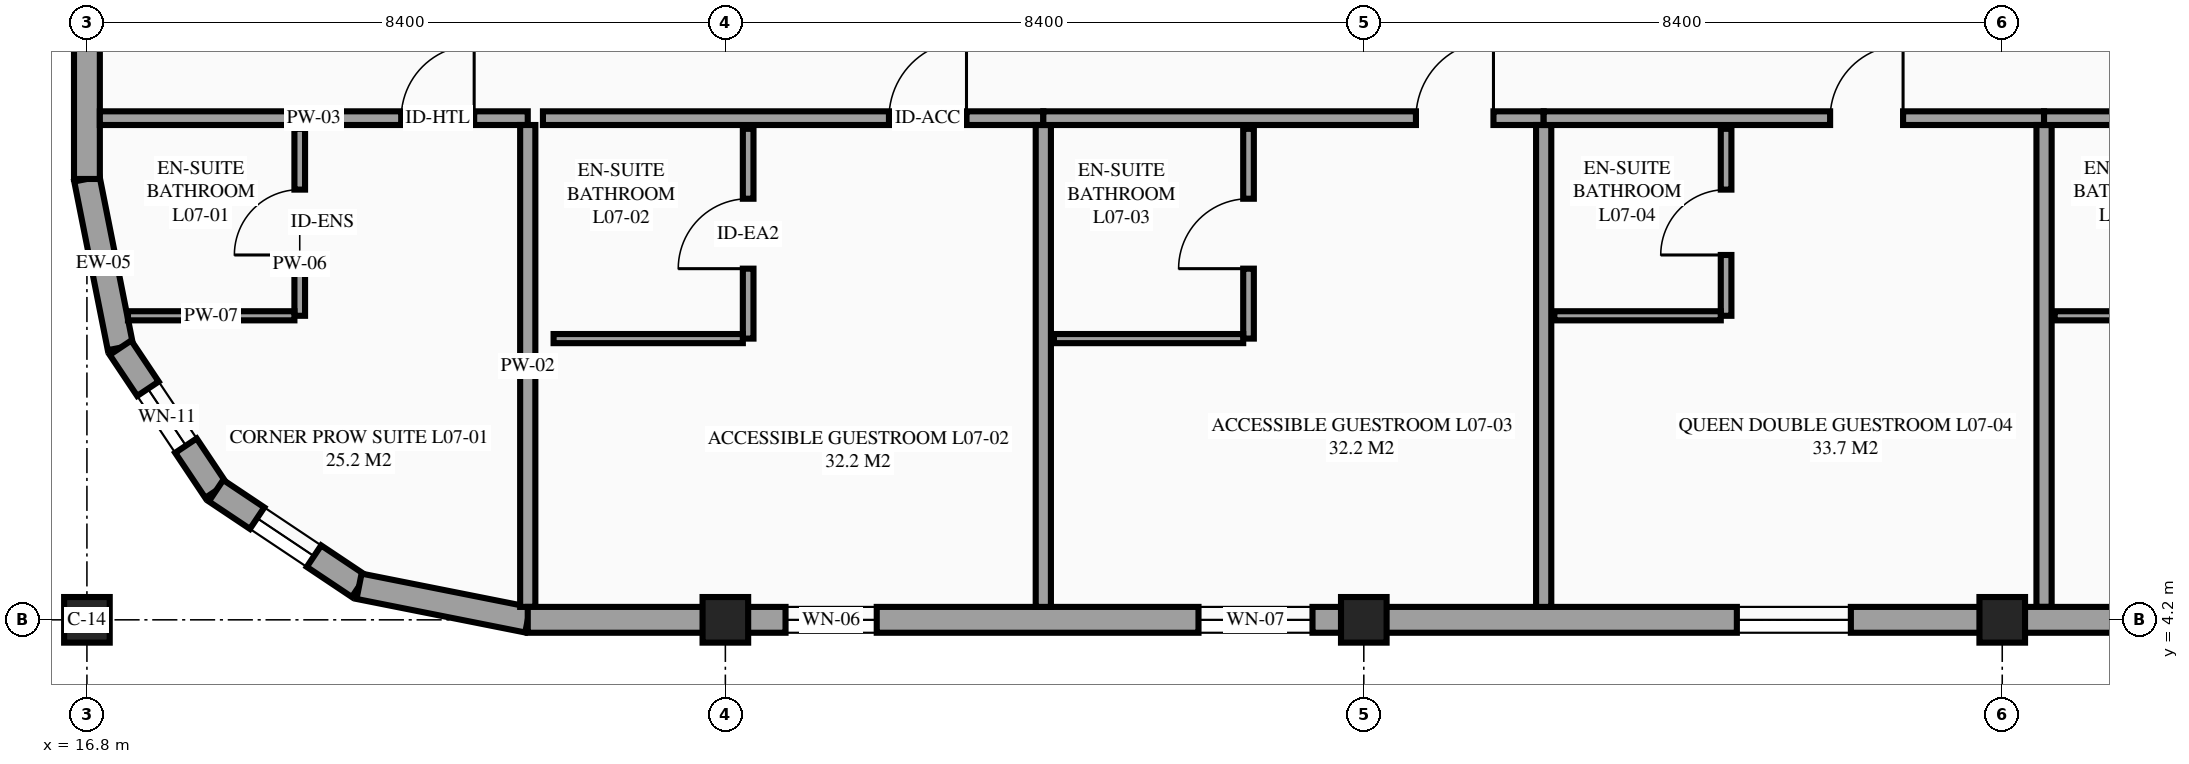
"""IFC4 building model, lengths in metres.
Left out: names, types, materials, properties, quantities, classifications, styles, units other than length and angle.
Written with IfcOpenShell. Run it as: python <this file> out.ifc"""

import sys

from ifc_helpers import new_model, si_unit, direction, frame, frame_2d, origin, origin_2d, place, context, subcontext, project, spatial, rectangle, extrude, element, fill, save


model = new_model("IFC4")
c1 = context("Model", 3, precision=1e-05, world=origin(), true_north=direction((0.0, 1.0)))
c2 = subcontext(c1, "Body", "Model", "MODEL_VIEW")
j1 = project(units=[si_unit("LENGTHUNIT", "METRE"), si_unit("PLANEANGLEUNIT", "RADIAN")], contexts=[c1])
p1 = place(None, origin())
s1 = spatial("IfcSite", under=j1, at=p1, CompositionType="ELEMENT")
p2 = place(p1, origin())
s2 = spatial("IfcBuilding", under=s1, at=p2, CompositionType="ELEMENT")
p3 = place(p2, frame((0.0, 0.0, 29.1)))
s3 = spatial("IfcBuildingStorey", under=s2, at=p3, CompositionType="ELEMENT", Elevation=29.1)
for number, where, z_axis, x_axis in (
    (1, (16.8, 4.2, 0.0), (0.0, 0.0, 1.0), (1.0, 0.0, 0.0)),
    (2, (25.2, 4.2, 0.0), (0.0, 0.0, 1.0), (1.0, 0.0, 0.0)),
    (3, (33.6, 4.2, 0.0), (0.0, 0.0, 1.0), (1.0, 0.0, 0.0)),
    (4, (42.0, 4.2, 0.0), (0.0, 0.0, 1.0), (1.0, 0.0, 0.0)),
):
    element("IfcColumn", number, at=place(p3, frame(where, z_axis=z_axis, x_axis=x_axis)), inside=s3, PredefinedType="COLUMN", context=c2, shape_type="SweptSolid", body=[
        extrude(rectangle(XDim=0.6, YDim=0.6, at=origin_2d()), origin(), (0.0, 0.0, 1.0), 3.6),
    ])
p4 = place(p3, frame((16.8, 10.0, 0.0), z_axis=(0.0, 0.0, 1.0), x_axis=(0.195057908159, -0.980791727363, 0.0)))
e5 = element("IfcWall", 5, at=p4, inside=s3, PredefinedType="STANDARD", context=c2, shape_type="SweptSolid", body=[
    extrude(rectangle(XDim=2.263, YDim=0.34, at=frame_2d((1.131, 0.0))), origin(), (0.0, 0.0, 1.0), 2.53),
])
p5 = place(p3, frame((17.241, 7.781, 0.0), z_axis=(0.0, 0.0, 1.0), x_axis=(0.555546297918, -0.831485604728, 0.0)))
e6 = element("IfcWall", 6, at=p5, inside=s3, PredefinedType="STANDARD", context=c2, shape_type="SweptSolid", body=[
    extrude(rectangle(XDim=2.263, YDim=0.34, at=frame_2d((1.132, 0.0))), origin(), (0.0, 0.0, 1.0), 3.6),
])
p6 = place(p5, frame((0.65, 0.0, 0.75)))
e7 = element("IfcOpeningElement", 7, at=p6, cuts=e6, PredefinedType="OPENING", context=c2, shape_type="SweptSolid", body=[
    extrude(rectangle(XDim=0.9, YDim=1.55, at=frame_2d((0.45, 0.775))), frame((0.0, 0.18, 0.0), z_axis=(0.0, -1.0, 0.0), x_axis=(1.0, 0.0, 0.0)), (0.0, 0.0, 1.0), 0.36),
])
p7 = place(p3, frame((18.499, 5.899, 0.0), z_axis=(0.0, 0.0, 1.0), x_axis=(0.831502143458, -0.555521543618, 0.0)))
e8 = element("IfcWall", 8, at=p7, inside=s3, PredefinedType="STANDARD", context=c2, shape_type="SweptSolid", body=[
    extrude(rectangle(XDim=2.263, YDim=0.34, at=frame_2d((1.131, 0.0))), origin(), (0.0, 0.0, 1.0), 3.6),
])
p8 = place(p7, frame((0.65, 0.0, 0.75)))
e9 = element("IfcOpeningElement", 9, at=p8, cuts=e8, PredefinedType="OPENING", context=c2, shape_type="SweptSolid", body=[
    extrude(rectangle(XDim=0.9, YDim=1.55, at=frame_2d((0.45, 0.775))), frame((0.0, 0.18, 0.0), z_axis=(0.0, -1.0, 0.0), x_axis=(1.0, 0.0, 0.0)), (0.0, 0.0, 1.0), 0.36),
])
p9 = place(p3, frame((20.38, 4.642, 0.0), z_axis=(0.0, 0.0, 1.0), x_axis=(0.98077519094, -0.195141038321, 0.0)))
e10 = element("IfcWall", 10, at=p9, inside=s3, PredefinedType="STANDARD", context=c2, shape_type="SweptSolid", body=[
    extrude(rectangle(XDim=2.263, YDim=0.34, at=frame_2d((1.132, 0.0))), origin(), (0.0, 0.0, 1.0), 3.133),
])
p10 = place(p3, frame((25.2, 4.2, 0.0), z_axis=(0.0, 0.0, 1.0), x_axis=(1.0, 0.0, 0.0)))
e11 = element("IfcWall", 11, at=p10, inside=s3, PredefinedType="STANDARD", context=c2, shape_type="SweptSolid", body=[
    extrude(rectangle(XDim=16.8, YDim=0.34, at=frame_2d((8.4, 0.0))), origin(), (0.0, 0.0, 1.0), 2.53),
])
p11 = place(p10, frame((0.792, 0.0, 0.85)))
e12 = element("IfcOpeningElement", 12, at=p11, cuts=e11, PredefinedType="OPENING", context=c2, shape_type="SweptSolid", body=[
    extrude(rectangle(XDim=1.2, YDim=1.5, at=frame_2d((0.6, 0.75))), frame((0.0, 0.18, 0.0), z_axis=(0.0, -1.0, 0.0), x_axis=(1.0, 0.0, 0.0)), (0.0, 0.0, 1.0), 0.36),
])
p12 = place(p10, frame((6.225, 0.0, 0.85)))
e13 = element("IfcOpeningElement", 13, at=p12, cuts=e11, PredefinedType="OPENING", context=c2, shape_type="SweptSolid", body=[
    extrude(rectangle(XDim=1.5, YDim=1.5, at=frame_2d((0.75, 0.75))), frame((0.0, 0.18, 0.0), z_axis=(0.0, -1.0, 0.0), x_axis=(1.0, 0.0, 0.0)), (0.0, 0.0, 1.0), 0.36),
])
p13 = place(p10, frame((13.308, 0.0, 0.85)))
e14 = element("IfcOpeningElement", 14, at=p13, cuts=e11, PredefinedType="OPENING", context=c2, shape_type="SweptSolid", body=[
    extrude(rectangle(XDim=1.5, YDim=1.5, at=frame_2d((0.75, 0.75))), frame((0.0, 0.18, 0.0), z_axis=(0.0, -1.0, 0.0), x_axis=(1.0, 0.0, 0.0)), (0.0, 0.0, 1.0), 0.36),
])
p14 = place(p3, frame((16.8, 21.0, 0.0), z_axis=(0.0, 0.0, 1.0), x_axis=(0.0, -1.0, 0.0)))
e15 = element("IfcWall", 15, at=p14, inside=s3, PredefinedType="STANDARD", context=c2, shape_type="SweptSolid", body=[
    extrude(rectangle(XDim=11.0, YDim=0.34, at=frame_2d((5.5, 0.0))), origin(), (0.0, 0.0, 1.0), 2.53),
])
p15 = place(p3, frame((16.97, 10.8, 0.0), z_axis=(0.0, 0.0, 1.0), x_axis=(1.0, 0.0, 0.0)))
e16 = element("IfcWall", 16, at=p15, inside=s3, PredefinedType="PARTITIONING", context=c2, shape_type="SweptSolid", body=[
    extrude(rectangle(XDim=5.63, YDim=0.18, at=frame_2d((2.815, 0.0))), origin(), (0.0, 0.0, 1.0), 3.375),
])
p16 = place(p15, frame((3.965, 0.0, 0.0)))
e17 = element("IfcOpeningElement", 17, at=p16, cuts=e16, PredefinedType="OPENING", context=c2, shape_type="SweptSolid", body=[
    extrude(rectangle(XDim=0.96, YDim=2.15, at=frame_2d((0.48, 1.075))), frame((0.0, 0.1, 0.0), z_axis=(0.0, -1.0, 0.0), x_axis=(1.0, 0.0, 0.0)), (0.0, 0.0, 1.0), 0.2),
])
p17 = place(p3, frame((22.6, 4.37, 0.0), z_axis=(0.0, 0.0, 1.0), x_axis=(0.0, 1.0, 0.0)))
e18 = element("IfcWall", 18, at=p17, inside=s3, PredefinedType="PARTITIONING", context=c2, shape_type="SweptSolid", body=[
    extrude(rectangle(XDim=6.34, YDim=0.2, at=frame_2d((3.17, 0.0))), origin(), (0.0, 0.0, 1.0), 3.375),
])
p18 = place(p3, frame((19.6, 8.2, 0.0), z_axis=(0.0, 0.0, 1.0), x_axis=(0.0, 1.0, 0.0)))
e19 = element("IfcWall", 19, at=p18, inside=s3, PredefinedType="PARTITIONING", context=c2, shape_type="SweptSolid", body=[
    extrude(rectangle(XDim=2.46, YDim=0.14, at=frame_2d((1.23, 0.0))), origin(), (0.0, 0.0, 1.0), 3.375),
])
p19 = place(p18, frame((0.8, 0.0, 0.0)))
e20 = element("IfcOpeningElement", 20, at=p19, cuts=e19, PredefinedType="OPENING", context=c2, shape_type="SweptSolid", body=[
    extrude(rectangle(XDim=0.86, YDim=2.1, at=frame_2d((0.43, 1.05))), frame((0.0, 0.08, 0.0), z_axis=(0.0, -1.0, 0.0), x_axis=(1.0, 0.0, 0.0)), (0.0, 0.0, 1.0), 0.16),
])
p20 = place(p3, frame((17.34, 8.2, 0.0), z_axis=(0.0, 0.0, 1.0), x_axis=(1.0, 0.0, 0.0)))
e21 = element("IfcWall", 21, at=p20, inside=s3, PredefinedType="PARTITIONING", context=c2, shape_type="SweptSolid", body=[
    extrude(rectangle(XDim=2.19, YDim=0.12, at=frame_2d((1.095, 0.0))), origin(), (0.0, 0.0, 1.0), 3.375),
])
p21 = place(p3, frame((22.8, 10.8, 0.0), z_axis=(0.0, 0.0, 1.0), x_axis=(1.0, 0.0, 0.0)))
e22 = element("IfcWall", 22, at=p21, inside=s3, PredefinedType="PARTITIONING", context=c2, shape_type="SweptSolid", body=[
    extrude(rectangle(XDim=6.583, YDim=0.18, at=frame_2d((3.292, 0.0))), origin(), (0.0, 0.0, 1.0), 3.375),
])
p22 = place(p21, frame((4.552, 0.0, 0.0)))
e23 = element("IfcOpeningElement", 23, at=p22, cuts=e22, PredefinedType="OPENING", context=c2, shape_type="SweptSolid", body=[
    extrude(rectangle(XDim=1.02, YDim=2.15, at=frame_2d((0.51, 1.075))), frame((0.0, 0.1, 0.0), z_axis=(0.0, -1.0, 0.0), x_axis=(1.0, 0.0, 0.0)), (0.0, 0.0, 1.0), 0.2),
])
p23 = place(p3, frame((29.383, 4.37, 0.0), z_axis=(0.0, 0.0, 1.0), x_axis=(0.0, 1.0, 0.0)))
e24 = element("IfcWall", 24, at=p23, inside=s3, PredefinedType="PARTITIONING", context=c2, shape_type="SweptSolid", body=[
    extrude(rectangle(XDim=6.34, YDim=0.2, at=frame_2d((3.17, 0.0))), origin(), (0.0, 0.0, 1.0), 3.375),
])
p24 = place(p3, frame((25.5, 7.9, 0.0), z_axis=(0.0, 0.0, 1.0), x_axis=(0.0, 1.0, 0.0)))
e25 = element("IfcWall", 25, at=p24, inside=s3, PredefinedType="PARTITIONING", context=c2, shape_type="SweptSolid", body=[
    extrude(rectangle(XDim=2.76, YDim=0.14, at=frame_2d((1.38, 0.0))), origin(), (0.0, 0.0, 1.0), 3.375),
])
p25 = place(p24, frame((0.92, 0.0, 0.0)))
e26 = element("IfcOpeningElement", 26, at=p25, cuts=e25, PredefinedType="OPENING", context=c2, shape_type="SweptSolid", body=[
    extrude(rectangle(XDim=0.92, YDim=2.1, at=frame_2d((0.46, 1.05))), frame((0.0, 0.08, 0.0), z_axis=(0.0, -1.0, 0.0), x_axis=(1.0, 0.0, 0.0)), (0.0, 0.0, 1.0), 0.16),
])
p26 = place(p3, frame((22.94, 7.9, 0.0), z_axis=(0.0, 0.0, 1.0), x_axis=(1.0, 0.0, 0.0)))
e27 = element("IfcWall", 27, at=p26, inside=s3, PredefinedType="PARTITIONING", context=c2, shape_type="SweptSolid", body=[
    extrude(rectangle(XDim=2.49, YDim=0.12, at=frame_2d((1.245, 0.0))), origin(), (0.0, 0.0, 1.0), 3.375),
])
p27 = place(p3, frame((29.383, 10.8, 0.0), z_axis=(0.0, 0.0, 1.0), x_axis=(1.0, 0.0, 0.0)))
e28 = element("IfcWall", 28, at=p27, inside=s3, PredefinedType="PARTITIONING", context=c2, shape_type="SweptSolid", body=[
    extrude(rectangle(XDim=6.583, YDim=0.18, at=frame_2d((3.292, 0.0))), origin(), (0.0, 0.0, 1.0), 3.375),
])
p28 = place(p27, frame((4.903, 0.0, 0.0)))
e29 = element("IfcOpeningElement", 29, at=p28, cuts=e28, PredefinedType="OPENING", context=c2, shape_type="SweptSolid", body=[
    extrude(rectangle(XDim=1.02, YDim=2.15, at=frame_2d((0.51, 1.075))), frame((0.0, 0.1, 0.0), z_axis=(0.0, -1.0, 0.0), x_axis=(1.0, 0.0, 0.0)), (0.0, 0.0, 1.0), 0.2),
])
p29 = place(p3, frame((35.967, 4.37, 0.0), z_axis=(0.0, 0.0, 1.0), x_axis=(0.0, 1.0, 0.0)))
e30 = element("IfcWall", 30, at=p29, inside=s3, PredefinedType="PARTITIONING", context=c2, shape_type="SweptSolid", body=[
    extrude(rectangle(XDim=6.34, YDim=0.2, at=frame_2d((3.17, 0.0))), origin(), (0.0, 0.0, 1.0), 3.375),
])
p30 = place(p3, frame((32.083, 7.9, 0.0), z_axis=(0.0, 0.0, 1.0), x_axis=(0.0, 1.0, 0.0)))
e31 = element("IfcWall", 31, at=p30, inside=s3, PredefinedType="PARTITIONING", context=c2, shape_type="SweptSolid", body=[
    extrude(rectangle(XDim=2.76, YDim=0.14, at=frame_2d((1.38, 0.0))), origin(), (0.0, 0.0, 1.0), 3.375),
])
p31 = place(p30, frame((0.92, 0.0, 0.0)))
e32 = element("IfcOpeningElement", 32, at=p31, cuts=e31, PredefinedType="OPENING", context=c2, shape_type="SweptSolid", body=[
    extrude(rectangle(XDim=0.92, YDim=2.1, at=frame_2d((0.46, 1.05))), frame((0.0, 0.08, 0.0), z_axis=(0.0, -1.0, 0.0), x_axis=(1.0, 0.0, 0.0)), (0.0, 0.0, 1.0), 0.16),
])
p32 = place(p3, frame((29.523, 7.9, 0.0), z_axis=(0.0, 0.0, 1.0), x_axis=(1.0, 0.0, 0.0)))
e33 = element("IfcWall", 33, at=p32, inside=s3, PredefinedType="PARTITIONING", context=c2, shape_type="SweptSolid", body=[
    extrude(rectangle(XDim=2.49, YDim=0.12, at=frame_2d((1.245, 0.0))), origin(), (0.0, 0.0, 1.0), 3.375),
])
p33 = place(p3, frame((35.967, 10.8, 0.0), z_axis=(0.0, 0.0, 1.0), x_axis=(1.0, 0.0, 0.0)))
e34 = element("IfcWall", 34, at=p33, inside=s3, PredefinedType="PARTITIONING", context=c2, shape_type="SweptSolid", body=[
    extrude(rectangle(XDim=6.583, YDim=0.18, at=frame_2d((3.292, 0.0))), origin(), (0.0, 0.0, 1.0), 3.375),
])
p34 = place(p33, frame((3.769, 0.0, 0.0)))
e35 = element("IfcOpeningElement", 35, at=p34, cuts=e34, PredefinedType="OPENING", context=c2, shape_type="SweptSolid", body=[
    extrude(rectangle(XDim=0.96, YDim=2.15, at=frame_2d((0.48, 1.075))), frame((0.0, 0.1, 0.0), z_axis=(0.0, -1.0, 0.0), x_axis=(1.0, 0.0, 0.0)), (0.0, 0.0, 1.0), 0.2),
])
p35 = place(p3, frame((42.55, 4.37, 0.0), z_axis=(0.0, 0.0, 1.0), x_axis=(0.0, 1.0, 0.0)))
e36 = element("IfcWall", 36, at=p35, inside=s3, PredefinedType="PARTITIONING", context=c2, shape_type="SweptSolid", body=[
    extrude(rectangle(XDim=6.34, YDim=0.2, at=frame_2d((3.17, 0.0))), origin(), (0.0, 0.0, 1.0), 3.375),
])
p36 = place(p3, frame((38.367, 8.2, 0.0), z_axis=(0.0, 0.0, 1.0), x_axis=(0.0, 1.0, 0.0)))
e37 = element("IfcWall", 37, at=p36, inside=s3, PredefinedType="PARTITIONING", context=c2, shape_type="SweptSolid", body=[
    extrude(rectangle(XDim=2.46, YDim=0.14, at=frame_2d((1.23, 0.0))), origin(), (0.0, 0.0, 1.0), 3.375),
])
p37 = place(p36, frame((0.8, 0.0, 0.0)))
e38 = element("IfcOpeningElement", 38, at=p37, cuts=e37, PredefinedType="OPENING", context=c2, shape_type="SweptSolid", body=[
    extrude(rectangle(XDim=0.86, YDim=2.1, at=frame_2d((0.43, 1.05))), frame((0.0, 0.08, 0.0), z_axis=(0.0, -1.0, 0.0), x_axis=(1.0, 0.0, 0.0)), (0.0, 0.0, 1.0), 0.16),
])
p38 = place(p3, frame((36.107, 8.2, 0.0), z_axis=(0.0, 0.0, 1.0), x_axis=(1.0, 0.0, 0.0)))
e39 = element("IfcWall", 39, at=p38, inside=s3, PredefinedType="PARTITIONING", context=c2, shape_type="SweptSolid", body=[
    extrude(rectangle(XDim=2.19, YDim=0.12, at=frame_2d((1.095, 0.0))), origin(), (0.0, 0.0, 1.0), 3.375),
])
p39 = place(p3, frame((42.55, 10.8, 0.0), z_axis=(0.0, 0.0, 1.0), x_axis=(1.0, 0.0, 0.0)))
e40 = element("IfcWall", 40, at=p39, inside=s3, PredefinedType="PARTITIONING", context=c2, shape_type="SweptSolid", body=[
    extrude(rectangle(XDim=6.583, YDim=0.18, at=frame_2d((3.292, 0.0))), origin(), (0.0, 0.0, 1.0), 3.375),
])
p40 = place(p39, frame((4.469, 0.0, 0.0)))
e41 = element("IfcOpeningElement", 41, at=p40, cuts=e40, PredefinedType="OPENING", context=c2, shape_type="SweptSolid", body=[
    extrude(rectangle(XDim=0.96, YDim=2.15, at=frame_2d((0.48, 1.075))), frame((0.0, 0.1, 0.0), z_axis=(0.0, -1.0, 0.0), x_axis=(1.0, 0.0, 0.0)), (0.0, 0.0, 1.0), 0.2),
])
p41 = place(p3, frame((42.69, 8.2, 0.0), z_axis=(0.0, 0.0, 1.0), x_axis=(1.0, 0.0, 0.0)))
e42 = element("IfcWall", 42, at=p41, inside=s3, PredefinedType="PARTITIONING", context=c2, shape_type="SweptSolid", body=[
    extrude(rectangle(XDim=2.19, YDim=0.12, at=frame_2d((1.095, 0.0))), origin(), (0.0, 0.0, 1.0), 3.375),
])
p42 = place(p3, frame((22.6, 4.2, 0.0), z_axis=(0.0, 0.0, 1.0), x_axis=(1.0, 0.0, 0.0)))
e43 = element("IfcWall", 43, at=p42, inside=s3, PredefinedType="STANDARD", context=c2, shape_type="SweptSolid", body=[
    extrude(rectangle(XDim=2.6, YDim=0.34, at=frame_2d((1.3, 0.0))), origin(), (0.0, 0.0, 1.0), 3.133),
])
p43 = place(p3, frame((42.0, 4.2, 0.0), z_axis=(0.0, 0.0, 1.0), x_axis=(1.0, 0.0, 0.0)))
e44 = element("IfcWall", 44, at=p43, inside=s3, PredefinedType="STANDARD", context=c2, shape_type="SweptSolid", body=[
    extrude(rectangle(XDim=8.4, YDim=0.34, at=frame_2d((4.2, 0.0))), origin(), (0.0, 0.0, 1.0), 2.88),
])
p44 = place(p43, frame((3.092, 0.0, 0.85)))
e45 = element("IfcOpeningElement", 45, at=p44, cuts=e44, PredefinedType="OPENING", context=c2, shape_type="SweptSolid", body=[
    extrude(rectangle(XDim=1.5, YDim=1.5, at=frame_2d((0.75, 0.75))), frame((0.0, 0.18, 0.0), z_axis=(0.0, -1.0, 0.0), x_axis=(1.0, 0.0, 0.0)), (0.0, 0.0, 1.0), 0.36),
])
p45 = place(p6, origin())
e46 = element("IfcWindow", 46, at=p45, inside=s3, PartitioningType="SINGLE_PANEL", PredefinedType="WINDOW", context=c2, shape_type="SweptSolid", body=[
    extrude(rectangle(XDim=0.9, YDim=1.55, at=frame_2d((0.45, 0.775))), frame((0.0, 0.03, 0.0), z_axis=(0.0, -1.0, 0.0), x_axis=(1.0, 0.0, 0.0)), (0.0, 0.0, 1.0), 0.06),
])
fill(e7, e46)
p46 = place(p8, origin())
e47 = element("IfcWindow", 47, at=p46, inside=s3, PartitioningType="SINGLE_PANEL", PredefinedType="WINDOW", context=c2, shape_type="SweptSolid", body=[
    extrude(rectangle(XDim=0.9, YDim=1.55, at=frame_2d((0.45, 0.775))), frame((0.0, 0.03, 0.0), z_axis=(0.0, -1.0, 0.0), x_axis=(1.0, 0.0, 0.0)), (0.0, 0.0, 1.0), 0.06),
])
fill(e9, e47)
p47 = place(p11, origin())
e48 = element("IfcWindow", 48, at=p47, inside=s3, PartitioningType="SINGLE_PANEL", PredefinedType="WINDOW", context=c2, shape_type="SweptSolid", body=[
    extrude(rectangle(XDim=1.2, YDim=1.5, at=frame_2d((0.6, 0.75))), frame((0.0, 0.03, 0.0), z_axis=(0.0, -1.0, 0.0), x_axis=(1.0, 0.0, 0.0)), (0.0, 0.0, 1.0), 0.06),
])
fill(e12, e48)
p48 = place(p12, origin())
e49 = element("IfcWindow", 49, at=p48, inside=s3, PartitioningType="SINGLE_PANEL", PredefinedType="WINDOW", context=c2, shape_type="SweptSolid", body=[
    extrude(rectangle(XDim=1.5, YDim=1.5, at=frame_2d((0.75, 0.75))), frame((0.0, 0.03, 0.0), z_axis=(0.0, -1.0, 0.0), x_axis=(1.0, 0.0, 0.0)), (0.0, 0.0, 1.0), 0.06),
])
fill(e13, e49)
p49 = place(p13, origin())
e50 = element("IfcWindow", 50, at=p49, inside=s3, PartitioningType="SINGLE_PANEL", PredefinedType="WINDOW", context=c2, shape_type="SweptSolid", body=[
    extrude(rectangle(XDim=1.5, YDim=1.5, at=frame_2d((0.75, 0.75))), frame((0.0, 0.03, 0.0), z_axis=(0.0, -1.0, 0.0), x_axis=(1.0, 0.0, 0.0)), (0.0, 0.0, 1.0), 0.06),
])
fill(e14, e50)
p50 = place(p16, origin())
e51 = element("IfcDoor", 51, at=p50, inside=s3, OperationType="SINGLE_SWING_RIGHT", PredefinedType="DOOR", context=c2, shape_type="SweptSolid", body=[
    extrude(rectangle(XDim=0.96, YDim=2.15, at=frame_2d((0.48, 1.075))), frame((0.0, 0.025, 0.0), z_axis=(0.0, -1.0, 0.0), x_axis=(1.0, 0.0, 0.0)), (0.0, 0.0, 1.0), 0.05),
])
fill(e17, e51)
p51 = place(p19, origin())
e52 = element("IfcDoor", 52, at=p51, inside=s3, OperationType="SINGLE_SWING_LEFT", PredefinedType="DOOR", context=c2, shape_type="SweptSolid", body=[
    extrude(rectangle(XDim=0.86, YDim=2.1, at=frame_2d((0.43, 1.05))), frame((0.0, 0.025, 0.0), z_axis=(0.0, -1.0, 0.0), x_axis=(1.0, 0.0, 0.0)), (0.0, 0.0, 1.0), 0.05),
])
fill(e20, e52)
p52 = place(p22, origin())
e53 = element("IfcDoor", 53, at=p52, inside=s3, OperationType="SINGLE_SWING_RIGHT", PredefinedType="DOOR", context=c2, shape_type="SweptSolid", body=[
    extrude(rectangle(XDim=1.02, YDim=2.15, at=frame_2d((0.51, 1.075))), frame((0.0, 0.025, 0.0), z_axis=(0.0, -1.0, 0.0), x_axis=(1.0, 0.0, 0.0)), (0.0, 0.0, 1.0), 0.05),
])
fill(e23, e53)
p53 = place(p25, origin())
e54 = element("IfcDoor", 54, at=p53, inside=s3, OperationType="SINGLE_SWING_LEFT", PredefinedType="DOOR", context=c2, shape_type="SweptSolid", body=[
    extrude(rectangle(XDim=0.92, YDim=2.1, at=frame_2d((0.46, 1.05))), frame((0.0, 0.025, 0.0), z_axis=(0.0, -1.0, 0.0), x_axis=(1.0, 0.0, 0.0)), (0.0, 0.0, 1.0), 0.05),
])
fill(e26, e54)
p54 = place(p28, origin())
e55 = element("IfcDoor", 55, at=p54, inside=s3, OperationType="SINGLE_SWING_RIGHT", PredefinedType="DOOR", context=c2, shape_type="SweptSolid", body=[
    extrude(rectangle(XDim=1.02, YDim=2.15, at=frame_2d((0.51, 1.075))), frame((0.0, 0.025, 0.0), z_axis=(0.0, -1.0, 0.0), x_axis=(1.0, 0.0, 0.0)), (0.0, 0.0, 1.0), 0.05),
])
fill(e29, e55)
p55 = place(p31, origin())
e56 = element("IfcDoor", 56, at=p55, inside=s3, OperationType="SINGLE_SWING_LEFT", PredefinedType="DOOR", context=c2, shape_type="SweptSolid", body=[
    extrude(rectangle(XDim=0.92, YDim=2.1, at=frame_2d((0.46, 1.05))), frame((0.0, 0.025, 0.0), z_axis=(0.0, -1.0, 0.0), x_axis=(1.0, 0.0, 0.0)), (0.0, 0.0, 1.0), 0.05),
])
fill(e32, e56)
p56 = place(p34, origin())
e57 = element("IfcDoor", 57, at=p56, inside=s3, OperationType="SINGLE_SWING_RIGHT", PredefinedType="DOOR", context=c2, shape_type="SweptSolid", body=[
    extrude(rectangle(XDim=0.96, YDim=2.15, at=frame_2d((0.48, 1.075))), frame((0.0, 0.025, 0.0), z_axis=(0.0, -1.0, 0.0), x_axis=(1.0, 0.0, 0.0)), (0.0, 0.0, 1.0), 0.05),
])
fill(e35, e57)
p57 = place(p37, origin())
e58 = element("IfcDoor", 58, at=p57, inside=s3, OperationType="SINGLE_SWING_LEFT", PredefinedType="DOOR", context=c2, shape_type="SweptSolid", body=[
    extrude(rectangle(XDim=0.86, YDim=2.1, at=frame_2d((0.43, 1.05))), frame((0.0, 0.025, 0.0), z_axis=(0.0, -1.0, 0.0), x_axis=(1.0, 0.0, 0.0)), (0.0, 0.0, 1.0), 0.05),
])
fill(e38, e58)
save(model, sys.argv[1])
